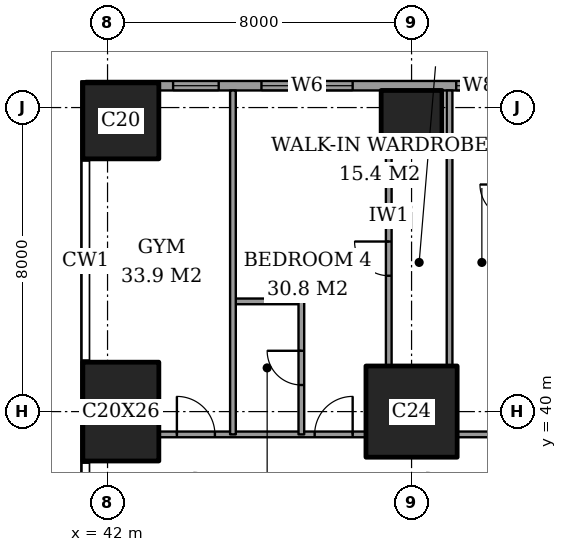
"""IFC4 building model, lengths in metres.
Left out: names, types, materials, properties, quantities, classifications, styles, units other than length and angle.
Written with IfcOpenShell. Run it as: python <this file> out.ifc"""

import sys

from ifc_helpers import new_model, si_unit, direction, frame, frame_2d, origin, origin_2d, place, context, subcontext, project, spatial, rectangle, extrude, element, fill, save


model = new_model("IFC4")
c1 = context("Model", 3, precision=1e-05, world=origin(), true_north=direction((0.0, 1.0)))
c2 = subcontext(c1, "Body", "Model", "MODEL_VIEW")
j1 = project(units=[si_unit("LENGTHUNIT", "METRE"), si_unit("PLANEANGLEUNIT", "RADIAN")], contexts=[c1])
p1 = place(None, origin())
s1 = spatial("IfcSite", under=j1, at=p1, CompositionType="ELEMENT")
p2 = place(p1, origin())
s2 = spatial("IfcBuilding", under=s1, at=p2, CompositionType="ELEMENT")
p3 = place(p2, frame((0.0, 0.0, 255.6)))
s3 = spatial("IfcBuildingStorey", under=s2, at=p3, CompositionType="ELEMENT", Elevation=255.6)
p4 = place(p3, frame((42.35, 40.0, 0.0), z_axis=(0.0, 0.0, 1.0), x_axis=(1.0, 0.0, 0.0)))
e1 = element("IfcColumn", 1, at=p4, inside=s3, PredefinedType="COLUMN", context=c2, shape_type="SweptSolid", body=[
    extrude(rectangle(XDim=2.0, YDim=2.6, at=origin_2d()), origin(), (0.0, 0.0, 1.0), 3.6),
])
p5 = place(p3, frame((42.35, 47.65, 0.0), z_axis=(0.0, 0.0, 1.0), x_axis=(1.0, 0.0, 0.0)))
e2 = element("IfcColumn", 2, at=p5, inside=s3, PredefinedType="COLUMN", context=c2, shape_type="SweptSolid", body=[
    extrude(rectangle(XDim=2.0, YDim=2.0, at=origin_2d()), origin(), (0.0, 0.0, 1.0), 3.6),
])
p6 = place(p3, frame((50.0, 40.0, 0.0), z_axis=(0.0, 0.0, 1.0), x_axis=(1.0, 0.0, 0.0)))
e3 = element("IfcColumn", 3, at=p6, inside=s3, PredefinedType="COLUMN", context=c2, shape_type="SweptSolid", body=[
    extrude(rectangle(XDim=2.4, YDim=2.4, at=origin_2d()), origin(), (0.0, 0.0, 1.0), 3.6),
])
p7 = place(p3, frame((50.0, 47.65, 0.0), z_axis=(0.0, 0.0, 1.0), x_axis=(1.0, 0.0, 0.0)))
e4 = element("IfcColumn", 4, at=p7, inside=s3, PredefinedType="COLUMN", context=c2, shape_type="SweptSolid", body=[
    extrude(rectangle(XDim=1.6, YDim=1.6, at=origin_2d()), origin(), (0.0, 0.0, 1.0), 3.6),
])
p8 = place(p3, frame((62.825, 48.575, 0.0), z_axis=(0.0, 0.0, 1.0), x_axis=(-1.0, 0.0, 0.0)))
e5 = element("IfcWall", 5, at=p8, inside=s3, PredefinedType="SOLIDWALL", context=c2, shape_type="SweptSolid", body=[
    extrude(rectangle(XDim=21.4, YDim=0.25, at=frame_2d((10.7, 0.0))), origin(), (0.0, 0.0, 1.0), 3.6),
])
p9 = place(p8, frame((0.5, 0.0, 0.6)))
e6 = element("IfcOpeningElement", 6, at=p9, cuts=e5, PredefinedType="OPENING", context=c2, shape_type="SweptSolid", body=[
    extrude(rectangle(XDim=1.2, YDim=2.0, at=frame_2d((0.6, 1.0))), frame((0.0, 0.135, 0.0), z_axis=(0.0, -1.0, 0.0), x_axis=(1.0, 0.0, 0.0)), (0.0, 0.0, 1.0), 0.27),
])
p10 = place(p8, frame((2.45, 0.0, 0.6)))
e7 = element("IfcOpeningElement", 7, at=p10, cuts=e5, PredefinedType="OPENING", context=c2, shape_type="SweptSolid", body=[
    extrude(rectangle(XDim=1.2, YDim=2.0, at=frame_2d((0.6, 1.0))), frame((0.0, 0.135, 0.0), z_axis=(0.0, -1.0, 0.0), x_axis=(1.0, 0.0, 0.0)), (0.0, 0.0, 1.0), 0.27),
])
p11 = place(p8, frame((6.775, 0.0, 0.6)))
e8 = element("IfcOpeningElement", 8, at=p11, cuts=e5, PredefinedType="OPENING", context=c2, shape_type="SweptSolid", body=[
    extrude(rectangle(XDim=2.4, YDim=2.0, at=frame_2d((1.2, 1.0))), frame((0.0, 0.135, 0.0), z_axis=(0.0, -1.0, 0.0), x_axis=(1.0, 0.0, 0.0)), (0.0, 0.0, 1.0), 0.27),
])
p12 = place(p8, frame((10.45, 0.0, 0.6)))
e9 = element("IfcOpeningElement", 9, at=p12, cuts=e5, PredefinedType="OPENING", context=c2, shape_type="SweptSolid", body=[
    extrude(rectangle(XDim=1.2, YDim=2.0, at=frame_2d((0.6, 1.0))), frame((0.0, 0.135, 0.0), z_axis=(0.0, -1.0, 0.0), x_axis=(1.0, 0.0, 0.0)), (0.0, 0.0, 1.0), 0.27),
])
p13 = place(p8, frame((14.375, 0.0, 0.6)))
e10 = element("IfcOpeningElement", 10, at=p13, cuts=e5, PredefinedType="OPENING", context=c2, shape_type="SweptSolid", body=[
    extrude(rectangle(XDim=2.4, YDim=2.0, at=frame_2d((1.2, 1.0))), frame((0.0, 0.135, 0.0), z_axis=(0.0, -1.0, 0.0), x_axis=(1.0, 0.0, 0.0)), (0.0, 0.0, 1.0), 0.27),
])
p14 = place(p8, frame((17.9, 0.0, 0.6)))
e11 = element("IfcOpeningElement", 11, at=p14, cuts=e5, PredefinedType="OPENING", context=c2, shape_type="SweptSolid", body=[
    extrude(rectangle(XDim=1.2, YDim=2.0, at=frame_2d((0.6, 1.0))), frame((0.0, 0.135, 0.0), z_axis=(0.0, -1.0, 0.0), x_axis=(1.0, 0.0, 0.0)), (0.0, 0.0, 1.0), 0.27),
])
p15 = place(p3, frame((43.35, 39.4, 0.0), z_axis=(0.0, 0.0, 1.0), x_axis=(1.0, 0.0, 0.0)))
e12 = element("IfcWall", 12, at=p15, inside=s3, PredefinedType="PARTITIONING", context=c2, shape_type="SweptSolid", body=[
    extrude(rectangle(XDim=5.45, YDim=0.15, at=frame_2d((2.725, 0.0))), origin(), (0.0, 0.0, 1.0), 3.35),
])
p16 = place(p15, frame((4.1, 0.0, 0.0)))
e13 = element("IfcOpeningElement", 13, at=p16, cuts=e12, PredefinedType="OPENING", context=c2, shape_type="SweptSolid", body=[
    extrude(rectangle(XDim=1.0, YDim=2.1, at=frame_2d((0.5, 1.05))), frame((0.0, 0.085, 0.0), z_axis=(0.0, -1.0, 0.0), x_axis=(1.0, 0.0, 0.0)), (0.0, 0.0, 1.0), 0.17),
])
p17 = place(p15, frame((0.475, 0.0, 0.0)))
e14 = element("IfcOpeningElement", 14, at=p17, cuts=e12, PredefinedType="OPENING", context=c2, shape_type="SweptSolid", body=[
    extrude(rectangle(XDim=1.0, YDim=2.1, at=frame_2d((0.5, 1.05))), frame((0.0, 0.085, 0.0), z_axis=(0.0, -1.0, 0.0), x_axis=(1.0, 0.0, 0.0)), (0.0, 0.0, 1.0), 0.17),
])
p18 = place(p3, frame((51.2, 39.4, 0.0), z_axis=(0.0, 0.0, 1.0), x_axis=(1.0, 0.0, 0.0)))
e15 = element("IfcWall", 15, at=p18, inside=s3, PredefinedType="PARTITIONING", context=c2, shape_type="SweptSolid", body=[
    extrude(rectangle(XDim=6.0, YDim=0.15, at=frame_2d((3.0, 0.0))), origin(), (0.0, 0.0, 1.0), 3.35),
])
p19 = place(p18, frame((4.15, 0.0, 0.0)))
e16 = element("IfcOpeningElement", 16, at=p19, cuts=e15, PredefinedType="OPENING", context=c2, shape_type="SweptSolid", body=[
    extrude(rectangle(XDim=1.0, YDim=2.1, at=frame_2d((0.5, 1.05))), frame((0.0, 0.085, 0.0), z_axis=(0.0, -1.0, 0.0), x_axis=(1.0, 0.0, 0.0)), (0.0, 0.0, 1.0), 0.17),
])
p20 = place(p3, frame((45.3, 42.9, 0.0), z_axis=(0.0, 0.0, 1.0), x_axis=(1.0, 0.0, 0.0)))
e17 = element("IfcWall", 17, at=p20, inside=s3, PredefinedType="PARTITIONING", context=c2, shape_type="SweptSolid", body=[
    extrude(rectangle(XDim=1.8, YDim=0.15, at=frame_2d((0.9, 0.0))), origin(), (0.0, 0.0, 1.0), 3.35),
])
p21 = place(p3, frame((45.3, 39.4, 0.0), z_axis=(0.0, 0.0, 1.0), x_axis=(0.0, 1.0, 0.0)))
e18 = element("IfcWall", 18, at=p21, inside=s3, PredefinedType="PARTITIONING", context=c2, shape_type="SweptSolid", body=[
    extrude(rectangle(XDim=9.05, YDim=0.15, at=frame_2d((4.525, 0.0))), origin(), (0.0, 0.0, 1.0), 3.35),
])
p22 = place(p3, frame((47.1, 39.4, 0.0), z_axis=(0.0, 0.0, 1.0), x_axis=(0.0, 1.0, 0.0)))
e19 = element("IfcWall", 19, at=p22, inside=s3, PredefinedType="PARTITIONING", context=c2, shape_type="SweptSolid", body=[
    extrude(rectangle(XDim=3.5, YDim=0.15, at=frame_2d((1.75, 0.0))), origin(), (0.0, 0.0, 1.0), 3.35),
])
p23 = place(p22, frame((1.3, 0.0, 0.0)))
e20 = element("IfcOpeningElement", 20, at=p23, cuts=e19, PredefinedType="OPENING", context=c2, shape_type="SweptSolid", body=[
    extrude(rectangle(XDim=0.9, YDim=2.1, at=frame_2d((0.45, 1.05))), frame((0.0, 0.085, 0.0), z_axis=(0.0, -1.0, 0.0), x_axis=(1.0, 0.0, 0.0)), (0.0, 0.0, 1.0), 0.17),
])
p24 = place(p3, frame((49.4, 41.2, 0.0), z_axis=(0.0, 0.0, 1.0), x_axis=(0.0, 1.0, 0.0)))
e21 = element("IfcWall", 21, at=p24, inside=s3, PredefinedType="PARTITIONING", context=c2, shape_type="SweptSolid", body=[
    extrude(rectangle(XDim=5.65, YDim=0.15, at=frame_2d((2.825, 0.0))), origin(), (0.0, 0.0, 1.0), 3.35),
])
p25 = place(p24, frame((2.375, 0.0, 0.0)))
e22 = element("IfcOpeningElement", 22, at=p25, cuts=e21, PredefinedType="OPENING", context=c2, shape_type="SweptSolid", body=[
    extrude(rectangle(XDim=0.9, YDim=2.1, at=frame_2d((0.45, 1.05))), frame((0.0, 0.085, 0.0), z_axis=(0.0, -1.0, 0.0), x_axis=(1.0, 0.0, 0.0)), (0.0, 0.0, 1.0), 0.17),
])
p26 = place(p3, frame((51.0, 41.2, 0.0), z_axis=(0.0, 0.0, 1.0), x_axis=(0.0, 1.0, 0.0)))
e23 = element("IfcWall", 23, at=p26, inside=s3, PredefinedType="PARTITIONING", context=c2, shape_type="SweptSolid", body=[
    extrude(rectangle(XDim=7.25, YDim=0.15, at=frame_2d((3.625, 0.0))), origin(), (0.0, 0.0, 1.0), 3.35),
])
p27 = place(p12, origin())
e24 = element("IfcWindow", 24, at=p27, inside=s3, PartitioningType="SINGLE_PANEL", PredefinedType="WINDOW", context=c2, shape_type="SweptSolid", body=[
    extrude(rectangle(XDim=1.2, YDim=2.0, at=frame_2d((0.6, 1.0))), frame((0.0, 0.03, 0.0), z_axis=(0.0, -1.0, 0.0), x_axis=(1.0, 0.0, 0.0)), (0.0, 0.0, 1.0), 0.06),
])
fill(e9, e24)
p28 = place(p13, origin())
e25 = element("IfcWindow", 25, at=p28, inside=s3, PartitioningType="SINGLE_PANEL", PredefinedType="WINDOW", context=c2, shape_type="SweptSolid", body=[
    extrude(rectangle(XDim=2.4, YDim=2.0, at=frame_2d((1.2, 1.0))), frame((0.0, 0.03, 0.0), z_axis=(0.0, -1.0, 0.0), x_axis=(1.0, 0.0, 0.0)), (0.0, 0.0, 1.0), 0.06),
])
fill(e10, e25)
p29 = place(p14, origin())
e26 = element("IfcWindow", 26, at=p29, inside=s3, PartitioningType="SINGLE_PANEL", PredefinedType="WINDOW", context=c2, shape_type="SweptSolid", body=[
    extrude(rectangle(XDim=1.2, YDim=2.0, at=frame_2d((0.6, 1.0))), frame((0.0, 0.03, 0.0), z_axis=(0.0, -1.0, 0.0), x_axis=(1.0, 0.0, 0.0)), (0.0, 0.0, 1.0), 0.06),
])
fill(e11, e26)
p30 = place(p25, origin())
e27 = element("IfcDoor", 27, at=p30, inside=s3, OperationType="SINGLE_SWING_LEFT", PredefinedType="DOOR", context=c2, shape_type="SweptSolid", body=[
    extrude(rectangle(XDim=0.9, YDim=2.1, at=frame_2d((0.45, 1.05))), frame((0.0, 0.025, 0.0), z_axis=(0.0, -1.0, 0.0), x_axis=(1.0, 0.0, 0.0)), (0.0, 0.0, 1.0), 0.05),
])
fill(e22, e27)
p31 = place(p23, origin())
e28 = element("IfcDoor", 28, at=p31, inside=s3, OperationType="SINGLE_SWING_LEFT", PredefinedType="DOOR", context=c2, shape_type="SweptSolid", body=[
    extrude(rectangle(XDim=0.9, YDim=2.1, at=frame_2d((0.45, 1.05))), frame((0.0, 0.025, 0.0), z_axis=(0.0, -1.0, 0.0), x_axis=(1.0, 0.0, 0.0)), (0.0, 0.0, 1.0), 0.05),
])
fill(e20, e28)
p32 = place(p16, origin())
e29 = element("IfcDoor", 29, at=p32, inside=s3, OperationType="SINGLE_SWING_LEFT", PredefinedType="DOOR", context=c2, shape_type="SweptSolid", body=[
    extrude(rectangle(XDim=1.0, YDim=2.1, at=frame_2d((0.5, 1.05))), frame((0.0, 0.025, 0.0), z_axis=(0.0, -1.0, 0.0), x_axis=(1.0, 0.0, 0.0)), (0.0, 0.0, 1.0), 0.05),
])
fill(e13, e29)
p33 = place(p17, origin())
e30 = element("IfcDoor", 30, at=p33, inside=s3, OperationType="SINGLE_SWING_RIGHT", PredefinedType="DOOR", context=c2, shape_type="SweptSolid", body=[
    extrude(rectangle(XDim=1.0, YDim=2.1, at=frame_2d((0.5, 1.05))), frame((0.0, 0.025, 0.0), z_axis=(0.0, -1.0, 0.0), x_axis=(1.0, 0.0, 0.0)), (0.0, 0.0, 1.0), 0.05),
])
fill(e14, e30)
save(model, sys.argv[1])
